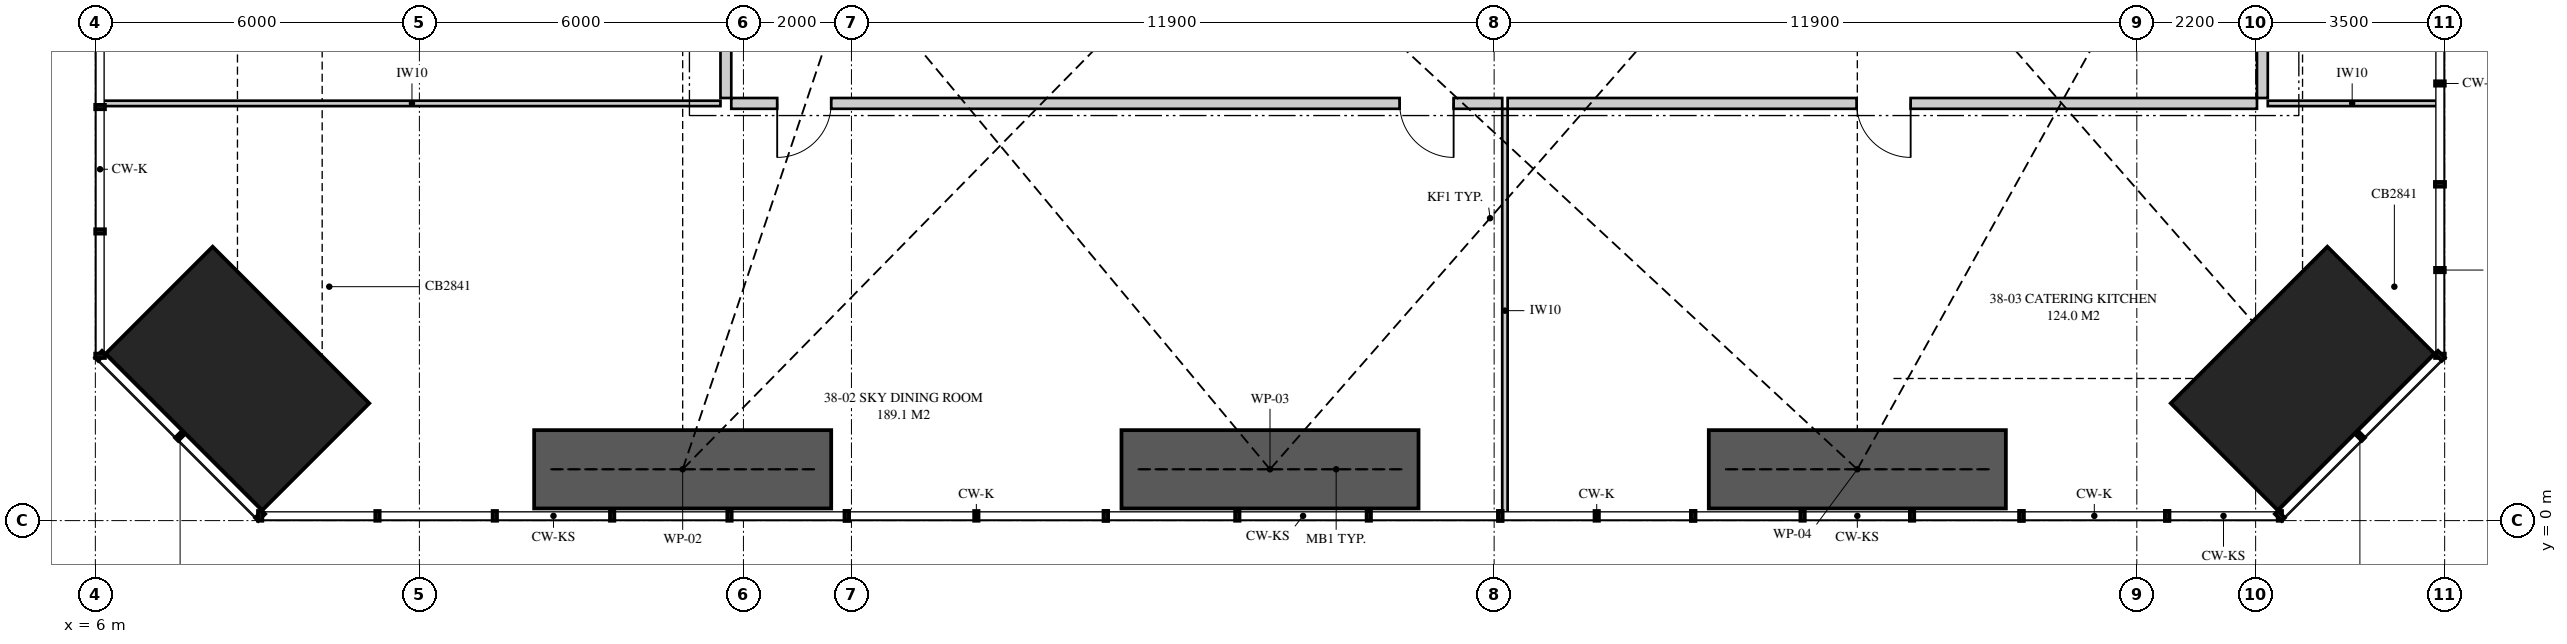
"""IFC4 building model, lengths in metres.
Left out: names, types, materials, properties, quantities, classifications, styles, units other than length and angle.
Written with IfcOpenShell. Run it as: python <this file> out.ifc"""

import sys

from ifc_helpers import new_model, si_unit, direction, frame, frame_2d, origin, origin_2d, place, context, subcontext, project, spatial, polyline, rectangle, hollow_rectangle, outline, extrude, element, fill, save


model = new_model("IFC4")
c1 = context("Model", 3, precision=1e-05, world=origin(), true_north=direction((0.0, 1.0)))
c2 = subcontext(c1, "Body", "Model", "MODEL_VIEW")
j1 = project(units=[si_unit("LENGTHUNIT", "METRE"), si_unit("PLANEANGLEUNIT", "RADIAN")], contexts=[c1])
p1 = place(None, origin())
s1 = spatial("IfcSite", under=j1, at=p1, CompositionType="ELEMENT")
p2 = place(p1, origin())
s2 = spatial("IfcBuilding", under=s1, at=p2, CompositionType="ELEMENT")
p3 = place(p2, frame((0.0, 0.0, 138.35)))
s3 = spatial("IfcBuildingStorey", under=s2, at=p3, CompositionType="ELEMENT", Elevation=138.35)
for number, where, z_axis, x_axis in (
    (1, (8.631, 2.631, 0.0), (0.0, 0.0, 1.0), (0.707, 0.707, 0.0)),
    (2, (46.869, 2.631, 0.0), (0.0, 0.0, 1.0), (-0.707, 0.707, 0.0)),
):
    element("IfcColumn", number, at=place(p3, frame(where, z_axis=z_axis, x_axis=x_axis)), inside=s3, PredefinedType="COLUMN", context=c2, shape_type="SweptSolid", body=[
        extrude(hollow_rectangle(XDim=2.8, YDim=4.1, WallThickness=0.125, at=origin_2d()), origin(), (0.0, 0.0, 1.0), 6.0),
    ])
p4 = place(p3, frame((17.775, 7.725, 0.0), z_axis=(0.0, 0.0, 1.0), x_axis=(1.0, 0.0, 0.0)))
e3 = element("IfcWall", 3, at=p4, inside=s3, PredefinedType="PARTITIONING", context=c2, shape_type="SweptSolid", body=[
    extrude(outline(polyline([(0.0, 0.0), (14.275, 0.0), (14.275, 5.72), (14.002, 5.72), (14.002, 5.141), (13.092, 5.141), (13.092, 5.72), (10.26, 5.72), (10.26, 5.208), (9.69, 5.208), (9.69, 5.72), (6.177, 5.72), (6.177, 5.141), (5.319, 5.141), (5.319, 5.72), (4.72, 5.72), (4.72, 5.141), (3.938, 5.141), (3.938, 5.72), (1.659, 5.72), (1.659, 5.141), (1.094, 5.141), (1.094, 5.72), (0.0, 5.72), (0.0, 0.0)])), frame((0.0, 0.1, 0.0), z_axis=(0.0, -1.0, 0.0), x_axis=(1.0, 0.0, 0.0)), (0.0, 0.0, 1.0), 0.2),
])
p5 = place(p4, frame((0.85, 0.0, 0.0)))
e4 = element("IfcOpeningElement", 4, at=p5, cuts=e3, PredefinedType="OPENING", context=c2, shape_type="SweptSolid", body=[
    extrude(rectangle(XDim=1.0, YDim=2.1, at=frame_2d((0.5, 1.05))), frame((0.0, 0.11, 0.0), z_axis=(0.0, -1.0, 0.0), x_axis=(1.0, 0.0, 0.0)), (0.0, 0.0, 1.0), 0.22),
])
p6 = place(p4, frame((12.375, 0.0, 0.0)))
e5 = element("IfcOpeningElement", 5, at=p6, cuts=e3, PredefinedType="OPENING", context=c2, shape_type="SweptSolid", body=[
    extrude(rectangle(XDim=1.0, YDim=2.1, at=frame_2d((0.5, 1.05))), frame((0.0, 0.11, 0.0), z_axis=(0.0, -1.0, 0.0), x_axis=(1.0, 0.0, 0.0)), (0.0, 0.0, 1.0), 0.22),
])
p7 = place(p3, frame((32.15, 7.725, 0.0), z_axis=(0.0, 0.0, 1.0), x_axis=(1.0, 0.0, 0.0)))
e6 = element("IfcWall", 6, at=p7, inside=s3, PredefinedType="PARTITIONING", context=c2, shape_type="SweptSolid", body=[
    extrude(outline(polyline([(0.0, 0.0), (13.875, 0.0), (13.875, 5.72), (10.662, 5.72), (10.662, 5.141), (9.859, 5.141), (9.859, 5.72), (7.185, 5.72), (7.185, 5.12), (5.765, 5.12), (5.765, 5.72), (1.939, 5.72), (1.939, 5.141), (1.135, 5.141), (1.135, 5.72), (0.0, 5.72), (0.0, 0.0)])), frame((0.0, 0.1, 0.0), z_axis=(0.0, -1.0, 0.0), x_axis=(1.0, 0.0, 0.0)), (0.0, 0.0, 1.0), 0.2),
])
p8 = place(p7, frame((6.462, 0.0, 0.0)))
e7 = element("IfcOpeningElement", 7, at=p8, cuts=e6, PredefinedType="OPENING", context=c2, shape_type="SweptSolid", body=[
    extrude(rectangle(XDim=1.0, YDim=2.1, at=frame_2d((0.5, 1.05))), frame((0.0, 0.11, 0.0), z_axis=(0.0, -1.0, 0.0), x_axis=(1.0, 0.0, 0.0)), (0.0, 0.0, 1.0), 0.22),
])
for number, where, z_axis, x_axis in (
    (8, (17.675, 7.825, 0.0), (0.0, 0.0, 1.0), (0.0, 1.0, 0.0)),
    (9, (46.125, 7.825, 0.0), (0.0, 0.0, 1.0), (0.0, 1.0, 0.0)),
):
    element("IfcWall", number, at=place(p3, frame(where, z_axis=z_axis, x_axis=x_axis)), inside=s3, PredefinedType="PARTITIONING", context=c2, shape_type="SweptSolid", body=[
        extrude(rectangle(XDim=1.55, YDim=0.2, at=frame_2d((0.775, 0.0))), origin(), (0.0, 0.0, 1.0), 5.72),
    ])
p9 = place(p3, frame((32.1, 0.15, 0.0), z_axis=(0.0, 0.0, 1.0), x_axis=(0.0, 1.0, 0.0)))
e10 = element("IfcWall", 10, at=p9, inside=s3, PredefinedType="PARTITIONING", context=c2, shape_type="SweptSolid", body=[
    extrude(outline(polyline([(0.0, 0.0), (7.475, 0.0), (7.475, 5.72), (7.222, 5.72), (7.222, 5.141), (6.485, 5.141), (6.485, 5.72), (6.179, 5.72), (6.179, 5.141), (5.348, 5.141), (5.348, 5.72), (1.5, 5.72), (1.5, 4.32), (0.1, 4.32), (0.1, 5.72), (0.0, 5.72), (0.0, 0.0)])), frame((0.0, 0.05, 0.0), z_axis=(0.0, -1.0, 0.0), x_axis=(1.0, 0.0, 0.0)), (0.0, 0.0, 1.0), 0.1),
])
p10 = place(p3, frame((6.15, 7.725, 0.0), z_axis=(0.0, 0.0, 1.0), x_axis=(1.0, 0.0, 0.0)))
e11 = element("IfcWall", 11, at=p10, inside=s3, PredefinedType="PARTITIONING", context=c2, shape_type="SweptSolid", body=[
    extrude(outline(polyline([(0.0, 0.0), (11.425, 0.0), (11.425, 5.72), (11.385, 5.72), (11.385, 5.12), (10.065, 5.12), (10.065, 5.72), (5.31, 5.72), (5.31, 5.12), (2.841, 5.12), (2.841, 4.52), (2.373, 4.52), (2.373, 4.32), (0.938, 4.32), (0.938, 5.72), (0.0, 5.72), (0.0, 0.0)])), frame((0.0, 0.05, 0.0), z_axis=(0.0, -1.0, 0.0), x_axis=(1.0, 0.0, 0.0)), (0.0, 0.0, 1.0), 0.1),
])
p11 = place(p3, frame((46.225, 7.725, 0.0), z_axis=(0.0, 0.0, 1.0), x_axis=(1.0, 0.0, 0.0)))
e12 = element("IfcWall", 12, at=p11, inside=s3, PredefinedType="PARTITIONING", context=c2, shape_type="SweptSolid", body=[
    extrude(outline(polyline([(0.0, 0.0), (3.125, 0.0), (3.125, 5.72), (2.187, 5.72), (2.187, 4.32), (0.752, 4.32), (0.752, 5.12), (0.0, 5.12), (0.0, 0.0)])), frame((0.0, 0.05, 0.0), z_axis=(0.0, -1.0, 0.0), x_axis=(1.0, 0.0, 0.0)), (0.0, 0.0, 1.0), 0.1),
])
for number, where, z_axis, x_axis in (
    (13, (14.125, 0.95, 0.0), (0.0, 0.0, 1.0), (1.0, 0.0, 0.0)),
    (14, (25.0, 0.95, 0.0), (0.0, 0.0, 1.0), (1.0, 0.0, 0.0)),
    (15, (35.875, 0.95, 0.0), (0.0, 0.0, 1.0), (1.0, 0.0, 0.0)),
):
    element("IfcWall", number, at=place(p3, frame(where, z_axis=z_axis, x_axis=x_axis)), inside=s3, PredefinedType="SHEAR", context=c2, shape_type="SweptSolid", body=[
        extrude(rectangle(XDim=5.5, YDim=1.45, at=frame_2d((2.75, 0.0))), origin(), (0.0, 0.0, 1.0), 6.0),
    ])
p12 = place(p5, frame((1.0, 0.0, 0.0), z_axis=(0.0, 0.0, 1.0), x_axis=(-1.0, 0.0, 0.0)))
e16 = element("IfcDoor", 16, at=p12, inside=s3, OperationType="SINGLE_SWING_RIGHT", PredefinedType="DOOR", context=c2, shape_type="SweptSolid", body=[
    extrude(rectangle(XDim=1.0, YDim=2.1, at=frame_2d((0.5, 1.05))), frame((0.0, 0.025, 0.0), z_axis=(0.0, -1.0, 0.0), x_axis=(1.0, 0.0, 0.0)), (0.0, 0.0, 1.0), 0.05),
])
fill(e4, e16)
p13 = place(p6, frame((1.0, 0.0, 0.0), z_axis=(0.0, 0.0, 1.0), x_axis=(-1.0, 0.0, 0.0)))
e17 = element("IfcDoor", 17, at=p13, inside=s3, OperationType="SINGLE_SWING_LEFT", PredefinedType="DOOR", context=c2, shape_type="SweptSolid", body=[
    extrude(rectangle(XDim=1.0, YDim=2.1, at=frame_2d((0.5, 1.05))), frame((0.0, 0.025, 0.0), z_axis=(0.0, -1.0, 0.0), x_axis=(1.0, 0.0, 0.0)), (0.0, 0.0, 1.0), 0.05),
])
fill(e5, e17)
p14 = place(p8, frame((1.0, 0.0, 0.0), z_axis=(0.0, 0.0, 1.0), x_axis=(-1.0, 0.0, 0.0)))
e18 = element("IfcDoor", 18, at=p14, inside=s3, OperationType="SINGLE_SWING_LEFT", PredefinedType="DOOR", context=c2, shape_type="SweptSolid", body=[
    extrude(rectangle(XDim=1.0, YDim=2.1, at=frame_2d((0.5, 1.05))), frame((0.0, 0.025, 0.0), z_axis=(0.0, -1.0, 0.0), x_axis=(1.0, 0.0, 0.0)), (0.0, 0.0, 1.0), 0.05),
])
fill(e7, e18)
save(model, sys.argv[1])
